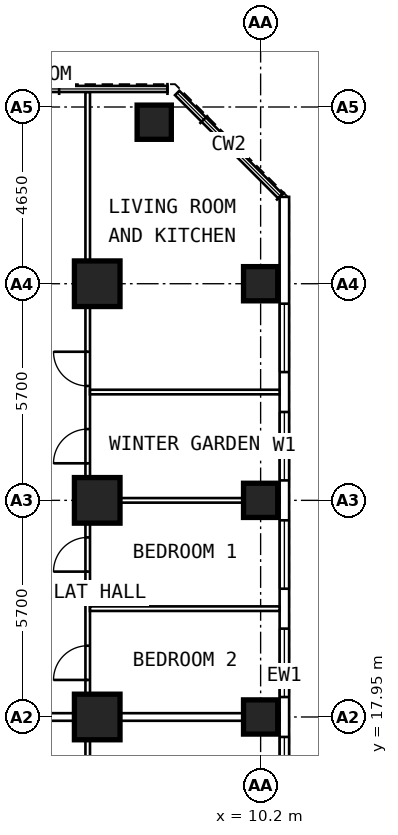
"""IFC4 building model, lengths in metres.
Left out: names, types, materials, properties, quantities, classifications, styles, units other than length and angle.
Written with IfcOpenShell. Run it as: python <this file> out.ifc"""

import sys

from ifc_helpers import new_model, si_unit, direction, frame, frame_2d, origin, origin_2d, place, context, subcontext, project, spatial, rectangle, extrude, element, fill, save


model = new_model("IFC4")
c1 = context("Model", 3, precision=1e-05, world=origin(), true_north=direction((0.0, 1.0)))
c2 = subcontext(c1, "Body", "Model", "MODEL_VIEW")
j1 = project(units=[si_unit("LENGTHUNIT", "METRE"), si_unit("PLANEANGLEUNIT", "RADIAN")], contexts=[c1])
p1 = place(None, origin())
s1 = spatial("IfcSite", under=j1, at=p1, CompositionType="ELEMENT")
p2 = place(p1, origin())
s2 = spatial("IfcBuilding", under=s1, at=p2, CompositionType="ELEMENT")
p3 = place(p2, frame((0.0, 0.0, 106.0)))
s3 = spatial("IfcBuildingStorey", under=s2, at=p3, CompositionType="ELEMENT", Elevation=106.0)
for number, where, z_axis, x_axis in (
    (1, (10.2, 17.95, 0.0), (0.0, 0.0, 1.0), (0.0, 1.0, 0.0)),
    (2, (10.2, 23.65, 0.0), (0.0, 0.0, 1.0), (0.0, 1.0, 0.0)),
    (3, (10.2, 29.35, 0.0), (0.0, 0.0, 1.0), (0.0, 1.0, 0.0)),
    (4, (7.4, 33.6, 0.0), (0.0, 0.0, 1.0), (0.0, 1.0, 0.0)),
):
    element("IfcColumn", number, at=place(p3, frame(where, z_axis=z_axis, x_axis=x_axis)), inside=s3, PredefinedType="COLUMN", context=c2, shape_type="SweptSolid", body=[
        extrude(rectangle(XDim=0.9, YDim=0.9, at=origin_2d()), origin(), (0.0, 0.0, 1.0), 3.6),
    ])
for number, where, z_axis, x_axis in (
    (5, (5.9, 17.95, 0.0), (0.0, 0.0, 1.0), (0.0, 1.0, 0.0)),
    (6, (5.9, 23.65, 0.0), (0.0, 0.0, 1.0), (0.0, 1.0, 0.0)),
    (7, (5.9, 29.35, 0.0), (0.0, 0.0, 1.0), (0.0, 1.0, 0.0)),
):
    element("IfcColumn", number, at=place(p3, frame(where, z_axis=z_axis, x_axis=x_axis)), inside=s3, PredefinedType="COLUMN", context=c2, shape_type="SweptSolid", body=[
        extrude(rectangle(XDim=1.2, YDim=1.2, at=origin_2d()), origin(), (0.0, 0.0, 1.0), 3.6),
    ])
p4 = place(p3, frame((10.825, 6.409, 0.0), z_axis=(0.0, 0.0, 1.0), x_axis=(0.0, 1.0, 0.0)))
e8 = element("IfcWall", 8, at=p4, inside=s3, PredefinedType="SOLIDWALL", context=c2, shape_type="SweptSolid", body=[
    extrude(rectangle(XDim=25.226, YDim=0.25, at=frame_2d((12.613, 0.0))), origin(), (0.0, 0.0, 1.0), 3.35),
])
p5 = place(p4, frame((0.666, 0.0, 0.8)))
e9 = element("IfcOpeningElement", 9, at=p5, cuts=e8, PredefinedType="OPENING", context=c2, shape_type="SweptSolid", body=[
    extrude(rectangle(XDim=1.8, YDim=1.8, at=frame_2d((0.9, 0.9))), frame((0.0, 0.137, 0.0), z_axis=(0.0, -1.0, 0.0), x_axis=(1.0, 0.0, 0.0)), (0.0, 0.0, 1.0), 0.274),
])
p6 = place(p4, frame((3.516, 0.0, 0.8)))
e10 = element("IfcOpeningElement", 10, at=p6, cuts=e8, PredefinedType="OPENING", context=c2, shape_type="SweptSolid", body=[
    extrude(rectangle(XDim=1.8, YDim=1.8, at=frame_2d((0.9, 0.9))), frame((0.0, 0.137, 0.0), z_axis=(0.0, -1.0, 0.0), x_axis=(1.0, 0.0, 0.0)), (0.0, 0.0, 1.0), 0.274),
])
p7 = place(p4, frame((6.366, 0.0, 0.8)))
e11 = element("IfcOpeningElement", 11, at=p7, cuts=e8, PredefinedType="OPENING", context=c2, shape_type="SweptSolid", body=[
    extrude(rectangle(XDim=1.8, YDim=1.8, at=frame_2d((0.9, 0.9))), frame((0.0, 0.137, 0.0), z_axis=(0.0, -1.0, 0.0), x_axis=(1.0, 0.0, 0.0)), (0.0, 0.0, 1.0), 0.274),
])
p8 = place(p4, frame((9.216, 0.0, 0.8)))
e12 = element("IfcOpeningElement", 12, at=p8, cuts=e8, PredefinedType="OPENING", context=c2, shape_type="SweptSolid", body=[
    extrude(rectangle(XDim=1.8, YDim=1.8, at=frame_2d((0.9, 0.9))), frame((0.0, 0.137, 0.0), z_axis=(0.0, -1.0, 0.0), x_axis=(1.0, 0.0, 0.0)), (0.0, 0.0, 1.0), 0.274),
])
p9 = place(p4, frame((12.066, 0.0, 0.8)))
e13 = element("IfcOpeningElement", 13, at=p9, cuts=e8, PredefinedType="OPENING", context=c2, shape_type="SweptSolid", body=[
    extrude(rectangle(XDim=1.8, YDim=1.8, at=frame_2d((0.9, 0.9))), frame((0.0, 0.137, 0.0), z_axis=(0.0, -1.0, 0.0), x_axis=(1.0, 0.0, 0.0)), (0.0, 0.0, 1.0), 0.274),
])
p10 = place(p4, frame((14.916, 0.0, 0.8)))
e14 = element("IfcOpeningElement", 14, at=p10, cuts=e8, PredefinedType="OPENING", context=c2, shape_type="SweptSolid", body=[
    extrude(rectangle(XDim=1.8, YDim=1.8, at=frame_2d((0.9, 0.9))), frame((0.0, 0.137, 0.0), z_axis=(0.0, -1.0, 0.0), x_axis=(1.0, 0.0, 0.0)), (0.0, 0.0, 1.0), 0.274),
])
p11 = place(p4, frame((17.766, 0.0, 0.8)))
e15 = element("IfcOpeningElement", 15, at=p11, cuts=e8, PredefinedType="OPENING", context=c2, shape_type="SweptSolid", body=[
    extrude(rectangle(XDim=1.8, YDim=1.8, at=frame_2d((0.9, 0.9))), frame((0.0, 0.137, 0.0), z_axis=(0.0, -1.0, 0.0), x_axis=(1.0, 0.0, 0.0)), (0.0, 0.0, 1.0), 0.274),
])
p12 = place(p4, frame((20.616, 0.0, 0.8)))
e16 = element("IfcOpeningElement", 16, at=p12, cuts=e8, PredefinedType="OPENING", context=c2, shape_type="SweptSolid", body=[
    extrude(rectangle(XDim=1.8, YDim=1.8, at=frame_2d((0.9, 0.9))), frame((0.0, 0.137, 0.0), z_axis=(0.0, -1.0, 0.0), x_axis=(1.0, 0.0, 0.0)), (0.0, 0.0, 1.0), 0.274),
])
p13 = place(p3, frame((5.65, 9.6, 0.0), z_axis=(0.0, 0.0, 1.0), x_axis=(0.0, 1.0, 0.0)))
e17 = element("IfcWall", 17, at=p13, inside=s3, PredefinedType="PARTITIONING", context=c2, shape_type="SweptSolid", body=[
    extrude(rectangle(XDim=8.1, YDim=0.12, at=frame_2d((4.05, 0.0))), origin(), (0.0, 0.0, 1.0), 3.35),
])
p14 = place(p13, frame((5.05, 0.0, 0.0)))
e18 = element("IfcOpeningElement", 18, at=p14, cuts=e17, PredefinedType="OPENING", context=c2, shape_type="SweptSolid", body=[
    extrude(rectangle(XDim=0.9, YDim=2.1, at=frame_2d((0.45, 1.05))), frame((0.0, 0.072, 0.0), z_axis=(0.0, -1.0, 0.0), x_axis=(1.0, 0.0, 0.0)), (0.0, 0.0, 1.0), 0.144),
])
p15 = place(p3, frame((5.65, 18.05, 0.0), z_axis=(0.0, 0.0, 1.0), x_axis=(0.0, 1.0, 0.0)))
e19 = element("IfcWall", 19, at=p15, inside=s3, PredefinedType="PARTITIONING", context=c2, shape_type="SweptSolid", body=[
    extrude(rectangle(XDim=16.345, YDim=0.12, at=frame_2d((8.172, 0.0))), origin(), (0.0, 0.0, 1.0), 3.35),
])
p16 = place(p15, frame((0.875, 0.0, 0.0)))
e20 = element("IfcOpeningElement", 20, at=p16, cuts=e19, PredefinedType="OPENING", context=c2, shape_type="SweptSolid", body=[
    extrude(rectangle(XDim=0.9, YDim=2.1, at=frame_2d((0.45, 1.05))), frame((0.0, 0.072, 0.0), z_axis=(0.0, -1.0, 0.0), x_axis=(1.0, 0.0, 0.0)), (0.0, 0.0, 1.0), 0.144),
])
p17 = place(p15, frame((3.725, 0.0, 0.0)))
e21 = element("IfcOpeningElement", 21, at=p17, cuts=e19, PredefinedType="OPENING", context=c2, shape_type="SweptSolid", body=[
    extrude(rectangle(XDim=0.9, YDim=2.1, at=frame_2d((0.45, 1.05))), frame((0.0, 0.072, 0.0), z_axis=(0.0, -1.0, 0.0), x_axis=(1.0, 0.0, 0.0)), (0.0, 0.0, 1.0), 0.144),
])
p18 = place(p15, frame((6.575, 0.0, 0.0)))
e22 = element("IfcOpeningElement", 22, at=p18, cuts=e19, PredefinedType="OPENING", context=c2, shape_type="SweptSolid", body=[
    extrude(rectangle(XDim=0.9, YDim=2.1, at=frame_2d((0.45, 1.05))), frame((0.0, 0.072, 0.0), z_axis=(0.0, -1.0, 0.0), x_axis=(1.0, 0.0, 0.0)), (0.0, 0.0, 1.0), 0.144),
])
p19 = place(p15, frame((8.61, 0.0, 0.0)))
e23 = element("IfcOpeningElement", 23, at=p19, cuts=e19, PredefinedType="OPENING", context=c2, shape_type="SweptSolid", body=[
    extrude(rectangle(XDim=0.9, YDim=2.1, at=frame_2d((0.45, 1.05))), frame((0.0, 0.072, 0.0), z_axis=(0.0, -1.0, 0.0), x_axis=(1.0, 0.0, 0.0)), (0.0, 0.0, 1.0), 0.144),
])
p20 = place(p3, frame((5.71, 20.8, 0.0), z_axis=(0.0, 0.0, 1.0), x_axis=(1.0, 0.0, 0.0)))
e24 = element("IfcWall", 24, at=p20, inside=s3, PredefinedType="PARTITIONING", context=c2, shape_type="SweptSolid", body=[
    extrude(rectangle(XDim=4.99, YDim=0.12, at=frame_2d((2.495, 0.0))), origin(), (0.0, 0.0, 1.0), 3.35),
])
p21 = place(p3, frame((5.71, 23.65, 0.0), z_axis=(0.0, 0.0, 1.0), x_axis=(1.0, 0.0, 0.0)))
e25 = element("IfcWall", 25, at=p21, inside=s3, PredefinedType="PARTITIONING", context=c2, shape_type="SweptSolid", body=[
    extrude(rectangle(XDim=4.99, YDim=0.12, at=frame_2d((2.495, 0.0))), origin(), (0.0, 0.0, 1.0), 2.45),
])
p22 = place(p3, frame((5.71, 26.5, 0.0), z_axis=(0.0, 0.0, 1.0), x_axis=(1.0, 0.0, 0.0)))
e26 = element("IfcWall", 26, at=p22, inside=s3, PredefinedType="PARTITIONING", context=c2, shape_type="SweptSolid", body=[
    extrude(rectangle(XDim=4.99, YDim=0.12, at=frame_2d((2.495, 0.0))), origin(), (0.0, 0.0, 1.0), 3.35),
])
p23 = place(p3, frame((2.1, 17.95, 0.0), z_axis=(0.0, 0.0, 1.0), x_axis=(1.0, 0.0, 0.0)))
e27 = element("IfcWall", 27, at=p23, inside=s3, PredefinedType="PARTITIONING", context=c2, shape_type="SweptSolid", body=[
    extrude(rectangle(XDim=8.6, YDim=0.2, at=frame_2d((4.3, 0.0))), origin(), (0.0, 0.0, 1.0), 2.45),
])
p24 = place(p8, origin())
e28 = element("IfcWindow", 28, at=p24, inside=s3, PartitioningType="SINGLE_PANEL", PredefinedType="WINDOW", context=c2, shape_type="SweptSolid", body=[
    extrude(rectangle(XDim=1.8, YDim=1.8, at=frame_2d((0.9, 0.9))), frame((0.0, 0.03, 0.0), z_axis=(0.0, -1.0, 0.0), x_axis=(1.0, 0.0, 0.0)), (0.0, 0.0, 1.0), 0.06),
])
fill(e12, e28)
p25 = place(p9, origin())
e29 = element("IfcWindow", 29, at=p25, inside=s3, PartitioningType="SINGLE_PANEL", PredefinedType="WINDOW", context=c2, shape_type="SweptSolid", body=[
    extrude(rectangle(XDim=1.8, YDim=1.8, at=frame_2d((0.9, 0.9))), frame((0.0, 0.03, 0.0), z_axis=(0.0, -1.0, 0.0), x_axis=(1.0, 0.0, 0.0)), (0.0, 0.0, 1.0), 0.06),
])
fill(e13, e29)
p26 = place(p10, origin())
e30 = element("IfcWindow", 30, at=p26, inside=s3, PartitioningType="SINGLE_PANEL", PredefinedType="WINDOW", context=c2, shape_type="SweptSolid", body=[
    extrude(rectangle(XDim=1.8, YDim=1.8, at=frame_2d((0.9, 0.9))), frame((0.0, 0.03, 0.0), z_axis=(0.0, -1.0, 0.0), x_axis=(1.0, 0.0, 0.0)), (0.0, 0.0, 1.0), 0.06),
])
fill(e14, e30)
p27 = place(p11, origin())
e31 = element("IfcWindow", 31, at=p27, inside=s3, PartitioningType="SINGLE_PANEL", PredefinedType="WINDOW", context=c2, shape_type="SweptSolid", body=[
    extrude(rectangle(XDim=1.8, YDim=1.8, at=frame_2d((0.9, 0.9))), frame((0.0, 0.03, 0.0), z_axis=(0.0, -1.0, 0.0), x_axis=(1.0, 0.0, 0.0)), (0.0, 0.0, 1.0), 0.06),
])
fill(e15, e31)
p28 = place(p12, origin())
e32 = element("IfcWindow", 32, at=p28, inside=s3, PartitioningType="SINGLE_PANEL", PredefinedType="WINDOW", context=c2, shape_type="SweptSolid", body=[
    extrude(rectangle(XDim=1.8, YDim=1.8, at=frame_2d((0.9, 0.9))), frame((0.0, 0.03, 0.0), z_axis=(0.0, -1.0, 0.0), x_axis=(1.0, 0.0, 0.0)), (0.0, 0.0, 1.0), 0.06),
])
fill(e16, e32)
p29 = place(p16, origin())
e33 = element("IfcDoor", 33, at=p29, inside=s3, OperationType="SINGLE_SWING_LEFT", PredefinedType="DOOR", context=c2, shape_type="SweptSolid", body=[
    extrude(rectangle(XDim=0.9, YDim=2.1, at=frame_2d((0.45, 1.05))), frame((0.0, 0.025, 0.0), z_axis=(0.0, -1.0, 0.0), x_axis=(1.0, 0.0, 0.0)), (0.0, 0.0, 1.0), 0.05),
])
fill(e20, e33)
p30 = place(p17, origin())
e34 = element("IfcDoor", 34, at=p30, inside=s3, OperationType="SINGLE_SWING_LEFT", PredefinedType="DOOR", context=c2, shape_type="SweptSolid", body=[
    extrude(rectangle(XDim=0.9, YDim=2.1, at=frame_2d((0.45, 1.05))), frame((0.0, 0.025, 0.0), z_axis=(0.0, -1.0, 0.0), x_axis=(1.0, 0.0, 0.0)), (0.0, 0.0, 1.0), 0.05),
])
fill(e21, e34)
p31 = place(p18, origin())
e35 = element("IfcDoor", 35, at=p31, inside=s3, OperationType="SINGLE_SWING_LEFT", PredefinedType="DOOR", context=c2, shape_type="SweptSolid", body=[
    extrude(rectangle(XDim=0.9, YDim=2.1, at=frame_2d((0.45, 1.05))), frame((0.0, 0.025, 0.0), z_axis=(0.0, -1.0, 0.0), x_axis=(1.0, 0.0, 0.0)), (0.0, 0.0, 1.0), 0.05),
])
fill(e22, e35)
p32 = place(p19, origin())
e36 = element("IfcDoor", 36, at=p32, inside=s3, OperationType="SINGLE_SWING_RIGHT", PredefinedType="DOOR", context=c2, shape_type="SweptSolid", body=[
    extrude(rectangle(XDim=0.9, YDim=2.1, at=frame_2d((0.45, 1.05))), frame((0.0, 0.025, 0.0), z_axis=(0.0, -1.0, 0.0), x_axis=(1.0, 0.0, 0.0)), (0.0, 0.0, 1.0), 0.05),
])
fill(e23, e36)
save(model, sys.argv[1])
